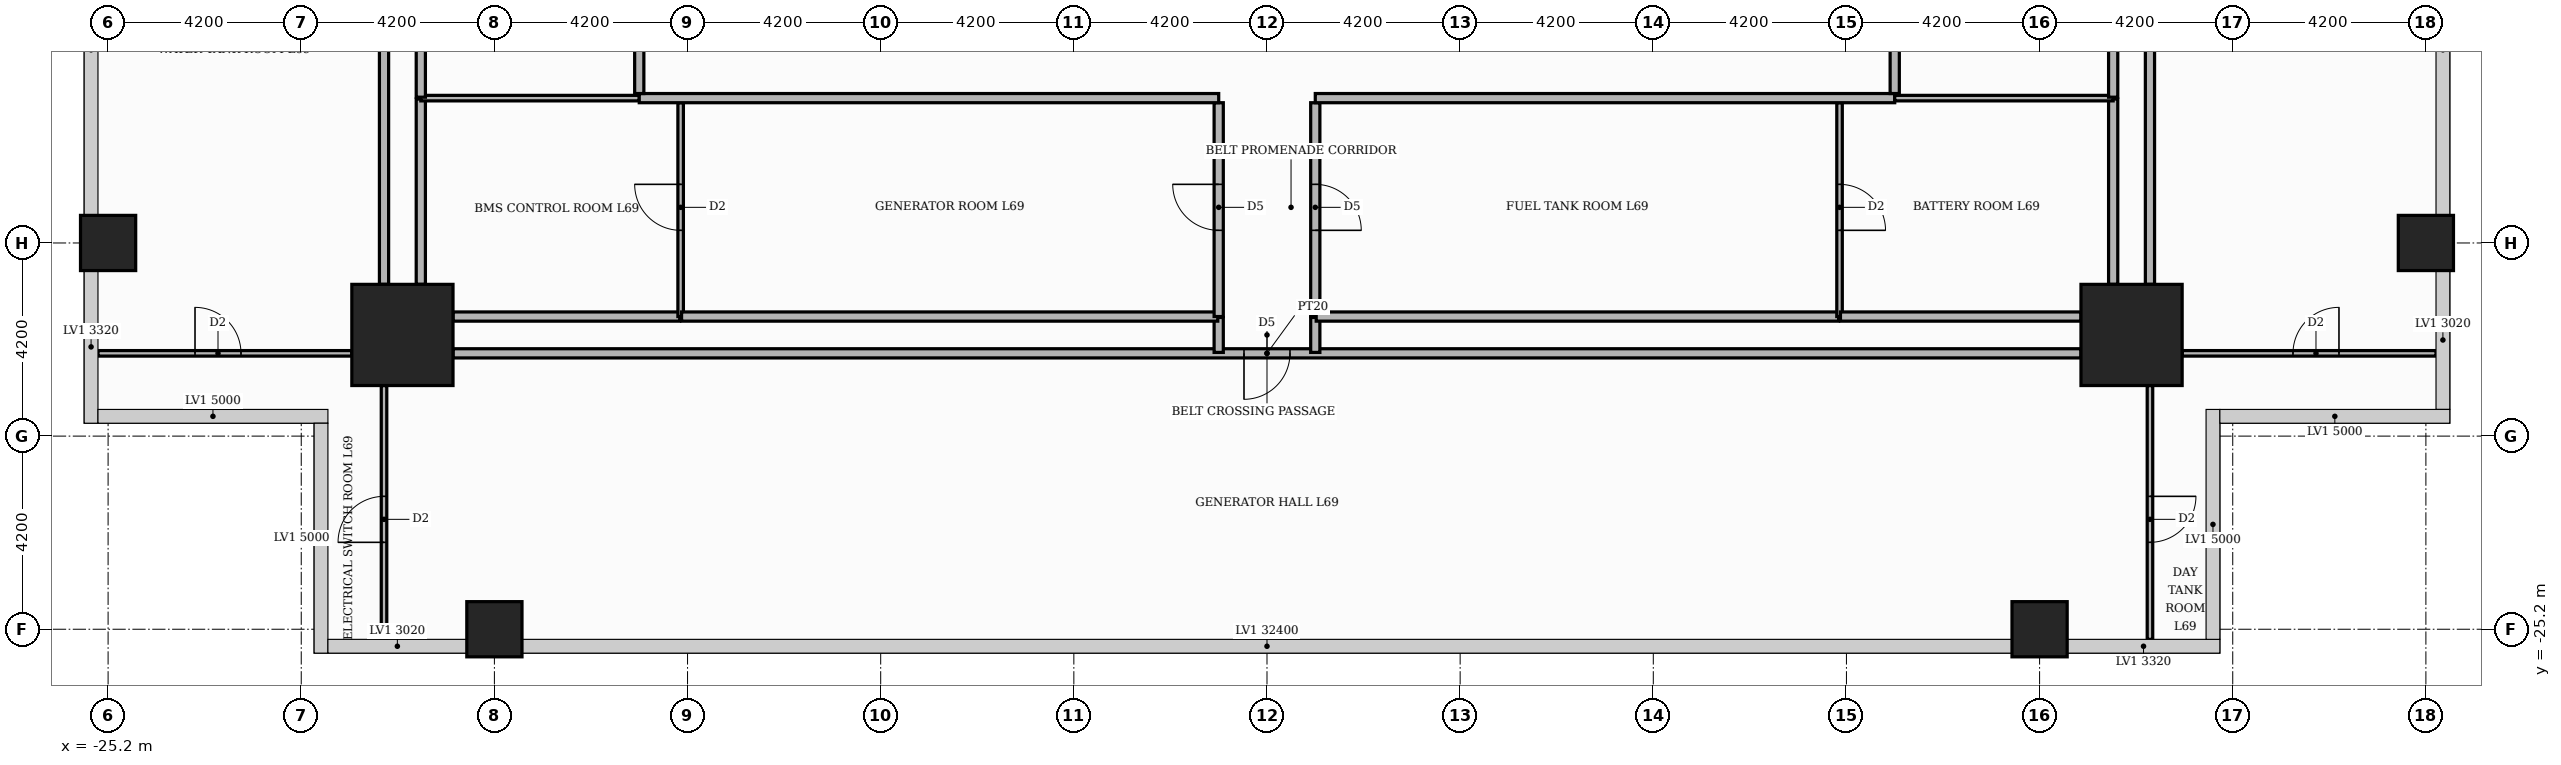
"""IFC4 building model, lengths in metres.
Left out: names, types, materials, properties, quantities, classifications, styles, units other than length and angle.
Written with IfcOpenShell. Run it as: python <this file> out.ifc"""

import sys

from ifc_helpers import new_model, si_unit, direction, frame, frame_2d, origin, origin_2d, place, context, subcontext, project, spatial, rectangle, extrude, element, fill, save


model = new_model("IFC4")
c1 = context("Model", 3, precision=1e-05, world=origin(), true_north=direction((0.0, 1.0)))
c2 = subcontext(c1, "Body", "Model", "MODEL_VIEW")
j1 = project(units=[si_unit("LENGTHUNIT", "METRE"), si_unit("PLANEANGLEUNIT", "RADIAN")], contexts=[c1])
p1 = place(None, origin())
s1 = spatial("IfcSite", under=j1, at=p1, CompositionType="ELEMENT")
p2 = place(p1, origin())
s2 = spatial("IfcBuilding", under=s1, at=p2, CompositionType="ELEMENT")
p3 = place(p2, frame((0.0, 0.0, 287.4)))
s3 = spatial("IfcBuildingStorey", under=s2, at=p3, CompositionType="ELEMENT", Elevation=287.4)
for number, where, z_axis, x_axis in (
    (1, (18.8, -18.8, 0.0), (0.0, 0.0, 1.0), (1.0, 0.0, 0.0)),
    (2, (-18.8, -18.8, 0.0), (0.0, 0.0, 1.0), (1.0, 0.0, 0.0)),
):
    element("IfcColumn", number, at=place(p3, frame(where, z_axis=z_axis, x_axis=x_axis)), inside=s3, PredefinedType="COLUMN", context=c2, shape_type="SweptSolid", body=[
        extrude(rectangle(XDim=2.2, YDim=2.2, at=origin_2d()), origin(), (0.0, 0.0, 1.0), 5.4),
    ])
for number, where, z_axis, x_axis in (
    (3, (25.2, -16.8, 0.0), (0.0, 0.0, 1.0), (1.0, 0.0, 0.0)),
    (4, (16.8, -25.2, 0.0), (0.0, 0.0, 1.0), (1.0, 0.0, 0.0)),
    (5, (-16.8, -25.2, 0.0), (0.0, 0.0, 1.0), (1.0, 0.0, 0.0)),
    (6, (-25.2, -16.8, 0.0), (0.0, 0.0, 1.0), (1.0, 0.0, 0.0)),
):
    element("IfcColumn", number, at=place(p3, frame(where, z_axis=z_axis, x_axis=x_axis)), inside=s3, PredefinedType="COLUMN", context=c2, shape_type="SweptSolid", body=[
        extrude(rectangle(XDim=1.2, YDim=1.2, at=origin_2d()), origin(), (0.0, 0.0, 1.0), 5.4),
    ])
p4 = place(p3, frame((-19.2, -25.42, 0.0), z_axis=(0.0, 0.0, 1.0), x_axis=(0.0, 1.0, 0.0)))
e7 = element("IfcWall", 7, at=p4, inside=s3, PredefinedType="PARTITIONING", context=c2, shape_type="SweptSolid", body=[
    extrude(rectangle(XDim=5.52, YDim=0.12, at=frame_2d((2.76, 0.0))), origin(), (0.0, 0.0, 1.0), 5.05),
])
p5 = place(p4, frame((2.11, 0.0, 0.0)))
e8 = element("IfcOpeningElement", 8, at=p5, cuts=e7, PredefinedType="OPENING", context=c2, shape_type="SweptSolid", body=[
    extrude(rectangle(XDim=1.0, YDim=2.1, at=frame_2d((0.5, 1.05))), frame((0.0, 0.07, 0.0), z_axis=(0.0, -1.0, 0.0), x_axis=(1.0, 0.0, 0.0)), (0.0, 0.0, 1.0), 0.14),
])
p6 = place(p3, frame((19.2, -25.42, 0.0), z_axis=(0.0, 0.0, 1.0), x_axis=(0.0, 1.0, 0.0)))
e9 = element("IfcWall", 9, at=p6, inside=s3, PredefinedType="PARTITIONING", context=c2, shape_type="SweptSolid", body=[
    extrude(rectangle(XDim=5.52, YDim=0.12, at=frame_2d((2.76, 0.0))), origin(), (0.0, 0.0, 1.0), 5.05),
])
p7 = place(p6, frame((2.11, 0.0, 0.0)))
e10 = element("IfcOpeningElement", 10, at=p7, cuts=e9, PredefinedType="OPENING", context=c2, shape_type="SweptSolid", body=[
    extrude(rectangle(XDim=1.0, YDim=2.1, at=frame_2d((0.5, 1.05))), frame((0.0, 0.07, 0.0), z_axis=(0.0, -1.0, 0.0), x_axis=(1.0, 0.0, 0.0)), (0.0, 0.0, 1.0), 0.14),
])
p8 = place(p3, frame((-25.42, -19.2, 0.0), z_axis=(0.0, 0.0, 1.0), x_axis=(1.0, 0.0, 0.0)))
e11 = element("IfcWall", 11, at=p8, inside=s3, PredefinedType="PARTITIONING", context=c2, shape_type="SweptSolid", body=[
    extrude(rectangle(XDim=5.52, YDim=0.12, at=frame_2d((2.76, 0.0))), origin(), (0.0, 0.0, 1.0), 5.05),
])
p9 = place(p8, frame((2.11, 0.0, 0.0)))
e12 = element("IfcOpeningElement", 12, at=p9, cuts=e11, PredefinedType="OPENING", context=c2, shape_type="SweptSolid", body=[
    extrude(rectangle(XDim=1.0, YDim=2.1, at=frame_2d((0.5, 1.05))), frame((0.0, 0.07, 0.0), z_axis=(0.0, -1.0, 0.0), x_axis=(1.0, 0.0, 0.0)), (0.0, 0.0, 1.0), 0.14),
])
p10 = place(p3, frame((-17.7, -19.2, 0.0), z_axis=(0.0, 0.0, 1.0), x_axis=(1.0, 0.0, 0.0)))
e13 = element("IfcWall", 13, at=p10, inside=s3, PredefinedType="PARTITIONING", context=c2, shape_type="SweptSolid", body=[
    extrude(rectangle(XDim=35.4, YDim=0.2, at=frame_2d((17.7, 0.0))), origin(), (0.0, 0.0, 1.0), 5.05),
])
p11 = place(p10, frame((17.2, 0.0, 0.0)))
e14 = element("IfcOpeningElement", 14, at=p11, cuts=e13, PredefinedType="OPENING", context=c2, shape_type="SweptSolid", body=[
    extrude(rectangle(XDim=1.0, YDim=2.1, at=frame_2d((0.5, 1.05))), frame((0.0, 0.11, 0.0), z_axis=(0.0, -1.0, 0.0), x_axis=(1.0, 0.0, 0.0)), (0.0, 0.0, 1.0), 0.22),
])
p12 = place(p3, frame((19.9, -19.2, 0.0), z_axis=(0.0, 0.0, 1.0), x_axis=(1.0, 0.0, 0.0)))
e15 = element("IfcWall", 15, at=p12, inside=s3, PredefinedType="PARTITIONING", context=c2, shape_type="SweptSolid", body=[
    extrude(rectangle(XDim=5.52, YDim=0.12, at=frame_2d((2.76, 0.0))), origin(), (0.0, 0.0, 1.0), 5.05),
])
p13 = place(p12, frame((2.41, 0.0, 0.0)))
e16 = element("IfcOpeningElement", 16, at=p13, cuts=e15, PredefinedType="OPENING", context=c2, shape_type="SweptSolid", body=[
    extrude(rectangle(XDim=1.0, YDim=2.1, at=frame_2d((0.5, 1.05))), frame((0.0, 0.07, 0.0), z_axis=(0.0, -1.0, 0.0), x_axis=(1.0, 0.0, 0.0)), (0.0, 0.0, 1.0), 0.14),
])
for number, where, z_axis, x_axis in (
    (17, (-1.05, -19.18, 0.0), (0.0, 0.0, 1.0), (0.0, 1.0, 0.0)),
    (18, (1.05, -19.18, 0.0), (0.0, 0.0, 1.0), (0.0, 1.0, 0.0)),
):
    element("IfcWall", number, at=place(p3, frame(where, z_axis=z_axis, x_axis=x_axis)), inside=s3, PredefinedType="PARTITIONING", context=c2, shape_type="SweptSolid", body=[
        extrude(rectangle(XDim=0.76, YDim=0.2, at=frame_2d((0.38, 0.0))), origin(), (0.0, 0.0, 1.0), 5.05),
    ])
p14 = place(p3, frame((-17.7, -18.4, 0.0), z_axis=(0.0, 0.0, 1.0), x_axis=(1.0, 0.0, 0.0)))
e19 = element("IfcWall", 19, at=p14, inside=s3, PredefinedType="PARTITIONING", context=c2, shape_type="SweptSolid", body=[
    extrude(rectangle(XDim=4.93, YDim=0.2, at=frame_2d((2.465, 0.0))), origin(), (0.0, 0.0, 1.0), 5.05),
])
p15 = place(p3, frame((-12.75, -18.4, 0.0), z_axis=(0.0, 0.0, 1.0), x_axis=(0.0, 1.0, 0.0)))
e20 = element("IfcWall", 20, at=p15, inside=s3, PredefinedType="PARTITIONING", context=c2, shape_type="SweptSolid", body=[
    extrude(rectangle(XDim=4.65, YDim=0.12, at=frame_2d((2.325, 0.0))), origin(), (0.0, 0.0, 1.0), 5.05),
])
p16 = place(p15, frame((1.875, 0.0, 0.0)))
e21 = element("IfcOpeningElement", 21, at=p16, cuts=e20, PredefinedType="OPENING", context=c2, shape_type="SweptSolid", body=[
    extrude(rectangle(XDim=1.0, YDim=2.1, at=frame_2d((0.5, 1.05))), frame((0.0, 0.07, 0.0), z_axis=(0.0, -1.0, 0.0), x_axis=(1.0, 0.0, 0.0)), (0.0, 0.0, 1.0), 0.14),
])
p17 = place(p3, frame((-12.73, -18.4, 0.0), z_axis=(0.0, 0.0, 1.0), x_axis=(1.0, 0.0, 0.0)))
e22 = element("IfcWall", 22, at=p17, inside=s3, PredefinedType="PARTITIONING", context=c2, shape_type="SweptSolid", body=[
    extrude(rectangle(XDim=11.66, YDim=0.2, at=frame_2d((5.83, 0.0))), origin(), (0.0, 0.0, 1.0), 5.05),
])
p18 = place(p3, frame((-1.05, -18.4, 0.0), z_axis=(0.0, 0.0, 1.0), x_axis=(0.0, 1.0, 0.0)))
e23 = element("IfcWall", 23, at=p18, inside=s3, PredefinedType="PARTITIONING", context=c2, shape_type="SweptSolid", body=[
    extrude(rectangle(XDim=4.65, YDim=0.2, at=frame_2d((2.325, 0.0))), origin(), (0.0, 0.0, 1.0), 5.05),
])
p19 = place(p18, frame((1.875, 0.0, 0.0)))
e24 = element("IfcOpeningElement", 24, at=p19, cuts=e23, PredefinedType="OPENING", context=c2, shape_type="SweptSolid", body=[
    extrude(rectangle(XDim=1.0, YDim=2.1, at=frame_2d((0.5, 1.05))), frame((0.0, 0.11, 0.0), z_axis=(0.0, -1.0, 0.0), x_axis=(1.0, 0.0, 0.0)), (0.0, 0.0, 1.0), 0.22),
])
p20 = place(p3, frame((1.05, -18.4, 0.0), z_axis=(0.0, 0.0, 1.0), x_axis=(0.0, 1.0, 0.0)))
e25 = element("IfcWall", 25, at=p20, inside=s3, PredefinedType="PARTITIONING", context=c2, shape_type="SweptSolid", body=[
    extrude(rectangle(XDim=4.65, YDim=0.2, at=frame_2d((2.325, 0.0))), origin(), (0.0, 0.0, 1.0), 5.05),
])
p21 = place(p20, frame((1.875, 0.0, 0.0)))
e26 = element("IfcOpeningElement", 26, at=p21, cuts=e25, PredefinedType="OPENING", context=c2, shape_type="SweptSolid", body=[
    extrude(rectangle(XDim=1.0, YDim=2.1, at=frame_2d((0.5, 1.05))), frame((0.0, 0.11, 0.0), z_axis=(0.0, -1.0, 0.0), x_axis=(1.0, 0.0, 0.0)), (0.0, 0.0, 1.0), 0.22),
])
p22 = place(p3, frame((1.07, -18.4, 0.0), z_axis=(0.0, 0.0, 1.0), x_axis=(1.0, 0.0, 0.0)))
e27 = element("IfcWall", 27, at=p22, inside=s3, PredefinedType="PARTITIONING", context=c2, shape_type="SweptSolid", body=[
    extrude(rectangle(XDim=11.36, YDim=0.2, at=frame_2d((5.68, 0.0))), origin(), (0.0, 0.0, 1.0), 5.05),
])
p23 = place(p3, frame((12.45, -18.4, 0.0), z_axis=(0.0, 0.0, 1.0), x_axis=(0.0, 1.0, 0.0)))
e28 = element("IfcWall", 28, at=p23, inside=s3, PredefinedType="PARTITIONING", context=c2, shape_type="SweptSolid", body=[
    extrude(rectangle(XDim=4.65, YDim=0.12, at=frame_2d((2.325, 0.0))), origin(), (0.0, 0.0, 1.0), 5.05),
])
p24 = place(p23, frame((1.875, 0.0, 0.0)))
e29 = element("IfcOpeningElement", 29, at=p24, cuts=e28, PredefinedType="OPENING", context=c2, shape_type="SweptSolid", body=[
    extrude(rectangle(XDim=1.0, YDim=2.1, at=frame_2d((0.5, 1.05))), frame((0.0, 0.07, 0.0), z_axis=(0.0, -1.0, 0.0), x_axis=(1.0, 0.0, 0.0)), (0.0, 0.0, 1.0), 0.14),
])
p25 = place(p3, frame((12.47, -18.4, 0.0), z_axis=(0.0, 0.0, 1.0), x_axis=(1.0, 0.0, 0.0)))
e30 = element("IfcWall", 30, at=p25, inside=s3, PredefinedType="PARTITIONING", context=c2, shape_type="SweptSolid", body=[
    extrude(rectangle(XDim=5.23, YDim=0.2, at=frame_2d((2.615, 0.0))), origin(), (0.0, 0.0, 1.0), 5.05),
])
p26 = place(p3, frame((-19.2, -17.7, 0.0), z_axis=(0.0, 0.0, 1.0), x_axis=(0.0, 1.0, 0.0)))
e31 = element("IfcWall", 31, at=p26, inside=s3, PredefinedType="PARTITIONING", context=c2, shape_type="SweptSolid", body=[
    extrude(rectangle(XDim=13.48, YDim=0.2, at=frame_2d((6.74, 0.0))), origin(), (0.0, 0.0, 1.0), 5.05),
])
for number, where, z_axis, x_axis in (
    (32, (-18.4, -17.7, 0.0), (0.0, 0.0, 1.0), (0.0, 1.0, 0.0)),
    (33, (18.4, -17.7, 0.0), (0.0, 0.0, 1.0), (0.0, 1.0, 0.0)),
):
    element("IfcWall", number, at=place(p3, frame(where, z_axis=z_axis, x_axis=x_axis)), inside=s3, PredefinedType="PARTITIONING", context=c2, shape_type="SweptSolid", body=[
        extrude(rectangle(XDim=4.03, YDim=0.2, at=frame_2d((2.015, 0.0))), origin(), (0.0, 0.0, 1.0), 5.05),
    ])
p27 = place(p3, frame((19.2, -17.7, 0.0), z_axis=(0.0, 0.0, 1.0), x_axis=(0.0, 1.0, 0.0)))
e34 = element("IfcWall", 34, at=p27, inside=s3, PredefinedType="PARTITIONING", context=c2, shape_type="SweptSolid", body=[
    extrude(rectangle(XDim=35.4, YDim=0.2, at=frame_2d((17.7, 0.0))), origin(), (0.0, 0.0, 1.0), 5.05),
])
p28 = place(p3, frame((-18.4, -13.65, 0.0), z_axis=(0.0, 0.0, 1.0), x_axis=(1.0, 0.0, 0.0)))
e35 = element("IfcWall", 35, at=p28, inside=s3, PredefinedType="PARTITIONING", context=c2, shape_type="SweptSolid", body=[
    extrude(rectangle(XDim=4.75, YDim=0.12, at=frame_2d((2.375, 0.0))), origin(), (0.0, 0.0, 1.0), 5.05),
])
for number, where, z_axis, x_axis in (
    (36, (-13.65, -13.65, 0.0), (0.0, 0.0, 1.0), (1.0, 0.0, 0.0)),
    (37, (1.05, -13.65, 0.0), (0.0, 0.0, 1.0), (1.0, 0.0, 0.0)),
):
    element("IfcWall", number, at=place(p3, frame(where, z_axis=z_axis, x_axis=x_axis)), inside=s3, PredefinedType="PARTITIONING", context=c2, shape_type="SweptSolid", body=[
        extrude(rectangle(XDim=12.6, YDim=0.2, at=frame_2d((6.3, 0.0))), origin(), (0.0, 0.0, 1.0), 5.05),
    ])
p29 = place(p3, frame((13.65, -13.65, 0.0), z_axis=(0.0, 0.0, 1.0), x_axis=(1.0, 0.0, 0.0)))
e38 = element("IfcWall", 38, at=p29, inside=s3, PredefinedType="PARTITIONING", context=c2, shape_type="SweptSolid", body=[
    extrude(rectangle(XDim=4.75, YDim=0.12, at=frame_2d((2.375, 0.0))), origin(), (0.0, 0.0, 1.0), 5.05),
])
p30 = place(p3, frame((-18.4, -13.63, 0.0), z_axis=(0.0, 0.0, 1.0), x_axis=(0.0, 1.0, 0.0)))
e39 = element("IfcWall", 39, at=p30, inside=s3, PredefinedType="PARTITIONING", context=c2, shape_type="SweptSolid", body=[
    extrude(rectangle(XDim=31.33, YDim=0.2, at=frame_2d((15.665, 0.0))), origin(), (0.0, 0.0, 1.0), 5.05),
])
p31 = place(p3, frame((18.4, -13.63, 0.0), z_axis=(0.0, 0.0, 1.0), x_axis=(0.0, 1.0, 0.0)))
e40 = element("IfcWall", 40, at=p31, inside=s3, PredefinedType="PARTITIONING", context=c2, shape_type="SweptSolid", body=[
    extrude(rectangle(XDim=12.41, YDim=0.2, at=frame_2d((6.205, 0.0))), origin(), (0.0, 0.0, 1.0), 5.05),
])
p32 = place(p3, frame((-13.65, -13.55, 0.0), z_axis=(0.0, 0.0, 1.0), x_axis=(0.0, 1.0, 0.0)))
e41 = element("IfcWall", 41, at=p32, inside=s3, PredefinedType="PARTITIONING", context=c2, shape_type="SweptSolid", body=[
    extrude(rectangle(XDim=27.1, YDim=0.2, at=frame_2d((13.55, 0.0))), origin(), (0.0, 0.0, 1.0), 5.05),
])
p33 = place(p3, frame((13.65, -13.55, 0.0), z_axis=(0.0, 0.0, 1.0), x_axis=(0.0, 1.0, 0.0)))
e42 = element("IfcWall", 42, at=p33, inside=s3, PredefinedType="PARTITIONING", context=c2, shape_type="SweptSolid", body=[
    extrude(rectangle(XDim=27.1, YDim=0.2, at=frame_2d((13.55, 0.0))), origin(), (0.0, 0.0, 1.0), 5.05),
])
p34 = place(p33, frame((5.625, 0.0, 0.0)))
e43 = element("IfcOpeningElement", 43, at=p34, cuts=e42, PredefinedType="OPENING", context=c2, shape_type="SweptSolid", body=[
    extrude(rectangle(XDim=1.0, YDim=2.1, at=frame_2d((0.5, 1.05))), frame((0.0, 0.11, 0.0), z_axis=(0.0, -1.0, 0.0), x_axis=(1.0, 0.0, 0.0)), (0.0, 0.0, 1.0), 0.22),
])
p35 = place(p19, origin())
e44 = element("IfcDoor", 44, at=p35, inside=s3, OperationType="SINGLE_SWING_RIGHT", PredefinedType="DOOR", context=c2, shape_type="SweptSolid", body=[
    extrude(rectangle(XDim=1.0, YDim=2.1, at=frame_2d((0.5, 1.05))), frame((0.0, 0.025, 0.0), z_axis=(0.0, -1.0, 0.0), x_axis=(1.0, 0.0, 0.0)), (0.0, 0.0, 1.0), 0.05),
])
fill(e24, e44)
p36 = place(p21, frame((1.0, 0.0, 0.0), z_axis=(0.0, 0.0, 1.0), x_axis=(-1.0, 0.0, 0.0)))
e45 = element("IfcDoor", 45, at=p36, inside=s3, OperationType="SINGLE_SWING_LEFT", PredefinedType="DOOR", context=c2, shape_type="SweptSolid", body=[
    extrude(rectangle(XDim=1.0, YDim=2.1, at=frame_2d((0.5, 1.05))), frame((0.0, 0.025, 0.0), z_axis=(0.0, -1.0, 0.0), x_axis=(1.0, 0.0, 0.0)), (0.0, 0.0, 1.0), 0.05),
])
fill(e26, e45)
p37 = place(p24, frame((1.0, 0.0, 0.0), z_axis=(0.0, 0.0, 1.0), x_axis=(-1.0, 0.0, 0.0)))
e46 = element("IfcDoor", 46, at=p37, inside=s3, OperationType="SINGLE_SWING_LEFT", PredefinedType="DOOR", context=c2, shape_type="SweptSolid", body=[
    extrude(rectangle(XDim=1.0, YDim=2.1, at=frame_2d((0.5, 1.05))), frame((0.0, 0.025, 0.0), z_axis=(0.0, -1.0, 0.0), x_axis=(1.0, 0.0, 0.0)), (0.0, 0.0, 1.0), 0.05),
])
fill(e29, e46)
p38 = place(p16, origin())
e47 = element("IfcDoor", 47, at=p38, inside=s3, OperationType="SINGLE_SWING_RIGHT", PredefinedType="DOOR", context=c2, shape_type="SweptSolid", body=[
    extrude(rectangle(XDim=1.0, YDim=2.1, at=frame_2d((0.5, 1.05))), frame((0.0, 0.025, 0.0), z_axis=(0.0, -1.0, 0.0), x_axis=(1.0, 0.0, 0.0)), (0.0, 0.0, 1.0), 0.05),
])
fill(e21, e47)
p39 = place(p11, frame((1.0, 0.0, 0.0), z_axis=(0.0, 0.0, 1.0), x_axis=(-1.0, 0.0, 0.0)))
e48 = element("IfcDoor", 48, at=p39, inside=s3, OperationType="SINGLE_SWING_LEFT", PredefinedType="DOOR", context=c2, shape_type="SweptSolid", body=[
    extrude(rectangle(XDim=1.0, YDim=2.1, at=frame_2d((0.5, 1.05))), frame((0.0, 0.025, 0.0), z_axis=(0.0, -1.0, 0.0), x_axis=(1.0, 0.0, 0.0)), (0.0, 0.0, 1.0), 0.05),
])
fill(e14, e48)
p40 = place(p7, frame((1.0, 0.0, 0.0), z_axis=(0.0, 0.0, 1.0), x_axis=(-1.0, 0.0, 0.0)))
e49 = element("IfcDoor", 49, at=p40, inside=s3, OperationType="SINGLE_SWING_RIGHT", PredefinedType="DOOR", context=c2, shape_type="SweptSolid", body=[
    extrude(rectangle(XDim=1.0, YDim=2.1, at=frame_2d((0.5, 1.05))), frame((0.0, 0.025, 0.0), z_axis=(0.0, -1.0, 0.0), x_axis=(1.0, 0.0, 0.0)), (0.0, 0.0, 1.0), 0.05),
])
fill(e10, e49)
p41 = place(p5, origin())
e50 = element("IfcDoor", 50, at=p41, inside=s3, OperationType="SINGLE_SWING_LEFT", PredefinedType="DOOR", context=c2, shape_type="SweptSolid", body=[
    extrude(rectangle(XDim=1.0, YDim=2.1, at=frame_2d((0.5, 1.05))), frame((0.0, 0.025, 0.0), z_axis=(0.0, -1.0, 0.0), x_axis=(1.0, 0.0, 0.0)), (0.0, 0.0, 1.0), 0.05),
])
fill(e8, e50)
p42 = place(p13, origin())
e51 = element("IfcDoor", 51, at=p42, inside=s3, OperationType="SINGLE_SWING_RIGHT", PredefinedType="DOOR", context=c2, shape_type="SweptSolid", body=[
    extrude(rectangle(XDim=1.0, YDim=2.1, at=frame_2d((0.5, 1.05))), frame((0.0, 0.025, 0.0), z_axis=(0.0, -1.0, 0.0), x_axis=(1.0, 0.0, 0.0)), (0.0, 0.0, 1.0), 0.05),
])
fill(e16, e51)
p43 = place(p9, origin())
e52 = element("IfcDoor", 52, at=p43, inside=s3, OperationType="SINGLE_SWING_LEFT", PredefinedType="DOOR", context=c2, shape_type="SweptSolid", body=[
    extrude(rectangle(XDim=1.0, YDim=2.1, at=frame_2d((0.5, 1.05))), frame((0.0, 0.025, 0.0), z_axis=(0.0, -1.0, 0.0), x_axis=(1.0, 0.0, 0.0)), (0.0, 0.0, 1.0), 0.05),
])
fill(e12, e52)
save(model, sys.argv[1])
